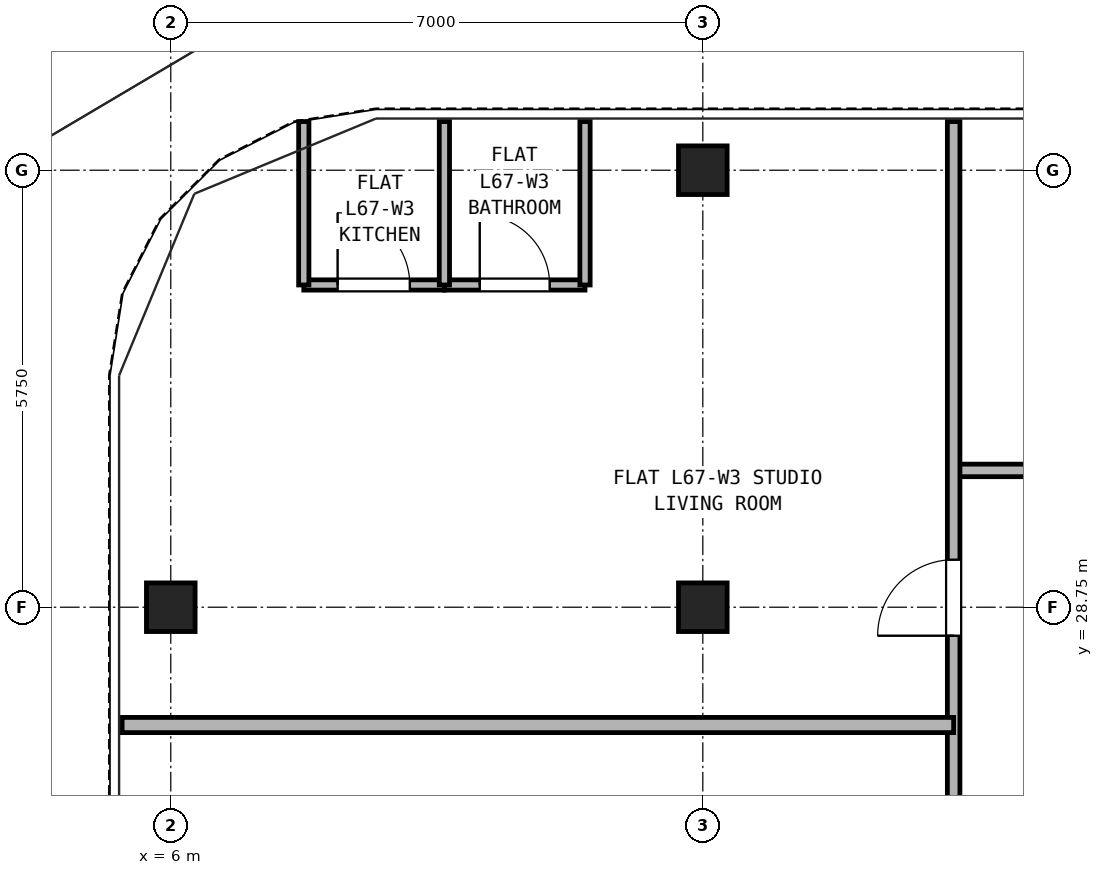
"""IFC4 building model, lengths in metres.
Left out: names, types, materials, properties, quantities, classifications, styles, units other than length and angle.
Written with IfcOpenShell. Run it as: python <this file> out.ifc"""

import sys

from ifc_helpers import new_model, si_unit, direction, frame, frame_2d, origin, origin_2d, place, context, subcontext, project, spatial, rectangle, hollow_rectangle, extrude, source, transform, mapped, element, fill, save


model = new_model("IFC4")
c1 = context("Model", 3, precision=1e-05, world=origin(), true_north=direction((0.0, 1.0)))
c2 = subcontext(c1, "Body", "Model", "MODEL_VIEW")
j1 = project(units=[si_unit("LENGTHUNIT", "METRE"), si_unit("PLANEANGLEUNIT", "RADIAN")], contexts=[c1])
p1 = place(None, origin())
s1 = spatial("IfcSite", under=j1, at=p1, CompositionType="ELEMENT")
p2 = place(p1, origin())
s2 = spatial("IfcBuilding", under=s1, at=p2, CompositionType="ELEMENT")
p3 = place(p2, frame((0.0, 0.0, 236.1)))
s3 = spatial("IfcBuildingStorey", under=s2, at=p3, CompositionType="ELEMENT", Elevation=236.1)
m1 = source(origin(), c2, "Body", "SweptSolid", [
    extrude(hollow_rectangle(XDim=0.64, YDim=0.64, WallThickness=0.035, at=origin_2d()), origin(), (0.0, 0.0, 1.0), 2.98),
])
for number, where, z_axis, x_axis in (
    (1, (13.0, 34.5, 0.0), (0.0, 0.0, 1.0), (1.0, 0.0, 0.0)),
    (2, (6.0, 28.75, 0.0), (0.0, 0.0, 1.0), (1.0, 0.0, 0.0)),
    (3, (13.0, 28.75, 0.0), (0.0, 0.0, 1.0), (1.0, 0.0, 0.0)),
):
    element("IfcColumn", number, at=place(p3, frame(where, z_axis=z_axis, x_axis=x_axis)), inside=s3, PredefinedType="COLUMN", context=c2, shape_type="MappedRepresentation", body=[
        mapped(m1, transform((0.0, 0.0, 0.0), x_axis=(1.0, 0.0, 0.0), y_axis=(0.0, 1.0, 0.0), z_axis=(0.0, 0.0, 1.0), scale=1.0)),
    ])
p4 = place(p3, frame((16.3, 30.55, 0.0), z_axis=(0.0, 0.0, 1.0), x_axis=(1.0, 0.0, 0.0)))
e4 = element("IfcWall", 4, at=p4, inside=s3, PredefinedType="PARTITIONING", context=c2, shape_type="SweptSolid", body=[
    extrude(rectangle(XDim=14.4, YDim=0.165, at=frame_2d((7.2, 0.0))), origin(), (0.0, 0.0, 1.0), 2.98),
])
p5 = place(p4, frame((2.1, 0.0, 0.0)))
e5 = element("IfcOpeningElement", 5, at=p5, cuts=e4, PredefinedType="OPENING", context=c2, shape_type="SweptSolid", body=[
    extrude(rectangle(XDim=0.95, YDim=2.15, at=frame_2d((0.475, 1.075))), frame((0.0, 0.093, 0.0), z_axis=(0.0, -1.0, 0.0), x_axis=(1.0, 0.0, 0.0)), (0.0, 0.0, 1.0), 0.185),
])
p6 = place(p4, frame((6.9, 0.0, 0.0)))
e6 = element("IfcOpeningElement", 6, at=p6, cuts=e4, PredefinedType="OPENING", context=c2, shape_type="SweptSolid", body=[
    extrude(rectangle(XDim=0.95, YDim=2.15, at=frame_2d((0.475, 1.075))), frame((0.0, 0.093, 0.0), z_axis=(0.0, -1.0, 0.0), x_axis=(1.0, 0.0, 0.0)), (0.0, 0.0, 1.0), 0.185),
])
p7 = place(p4, frame((11.5, 0.0, 0.0)))
e7 = element("IfcOpeningElement", 7, at=p7, cuts=e4, PredefinedType="OPENING", context=c2, shape_type="SweptSolid", body=[
    extrude(rectangle(XDim=0.92, YDim=2.1, at=frame_2d((0.46, 1.05))), frame((0.0, 0.093, 0.0), z_axis=(0.0, -1.0, 0.0), x_axis=(1.0, 0.0, 0.0)), (0.0, 0.0, 1.0), 0.185),
])
p8 = place(p3, frame((16.3, 11.45, 0.0), z_axis=(0.0, 0.0, 1.0), x_axis=(0.0, 1.0, 0.0)))
e8 = element("IfcWall", 8, at=p8, inside=s3, PredefinedType="PARTITIONING", context=c2, shape_type="SweptSolid", body=[
    extrude(rectangle(XDim=23.69, YDim=0.165, at=frame_2d((11.845, 0.0))), origin(), (0.0, 0.0, 1.0), 2.98),
])
p9 = place(p8, frame((3.275, 0.0, 0.0)))
e9 = element("IfcOpeningElement", 9, at=p9, cuts=e8, PredefinedType="OPENING", context=c2, shape_type="SweptSolid", body=[
    extrude(rectangle(XDim=1.0, YDim=2.15, at=frame_2d((0.5, 1.075))), frame((0.0, 0.093, 0.0), z_axis=(0.0, -1.0, 0.0), x_axis=(1.0, 0.0, 0.0)), (0.0, 0.0, 1.0), 0.185),
])
p10 = place(p8, frame((11.15, 0.0, 0.0)))
e10 = element("IfcOpeningElement", 10, at=p10, cuts=e8, PredefinedType="OPENING", context=c2, shape_type="SweptSolid", body=[
    extrude(rectangle(XDim=1.0, YDim=2.15, at=frame_2d((0.5, 1.075))), frame((0.0, 0.093, 0.0), z_axis=(0.0, -1.0, 0.0), x_axis=(1.0, 0.0, 0.0)), (0.0, 0.0, 1.0), 0.185),
])
p11 = place(p8, frame((16.925, 0.0, 0.0)))
e11 = element("IfcOpeningElement", 11, at=p11, cuts=e8, PredefinedType="OPENING", context=c2, shape_type="SweptSolid", body=[
    extrude(rectangle(XDim=1.0, YDim=2.15, at=frame_2d((0.5, 1.075))), frame((0.0, 0.093, 0.0), z_axis=(0.0, -1.0, 0.0), x_axis=(1.0, 0.0, 0.0)), (0.0, 0.0, 1.0), 0.185),
])
p12 = place(p3, frame((5.36, 27.2, 0.0), z_axis=(0.0, 0.0, 1.0), x_axis=(1.0, 0.0, 0.0)))
e12 = element("IfcWall", 12, at=p12, inside=s3, PredefinedType="PARTITIONING", context=c2, shape_type="SweptSolid", body=[
    extrude(rectangle(XDim=10.94, YDim=0.2, at=frame_2d((5.47, 0.0))), origin(), (0.0, 0.0, 1.0), 2.98),
])
p13 = place(p3, frame((7.75, 32.99, 0.0), z_axis=(0.0, 0.0, 1.0), x_axis=(1.0, 0.0, 0.0)))
e13 = element("IfcWall", 13, at=p13, inside=s3, PredefinedType="PARTITIONING", context=c2, shape_type="SweptSolid", body=[
    extrude(rectangle(XDim=1.85, YDim=0.135, at=frame_2d((0.925, 0.0))), origin(), (0.0, 0.0, 1.0), 2.98),
])
p14 = place(p13, frame((0.445, 0.0, 0.0)))
e14 = element("IfcOpeningElement", 14, at=p14, cuts=e13, PredefinedType="OPENING", context=c2, shape_type="SweptSolid", body=[
    extrude(rectangle(XDim=0.95, YDim=2.15, at=frame_2d((0.475, 1.075))), frame((0.0, 0.077, 0.0), z_axis=(0.0, -1.0, 0.0), x_axis=(1.0, 0.0, 0.0)), (0.0, 0.0, 1.0), 0.155),
])
p15 = place(p3, frame((9.6, 32.99, 0.0), z_axis=(0.0, 0.0, 1.0), x_axis=(1.0, 0.0, 0.0)))
e15 = element("IfcWall", 15, at=p15, inside=s3, PredefinedType="PARTITIONING", context=c2, shape_type="SweptSolid", body=[
    extrude(rectangle(XDim=1.85, YDim=0.135, at=frame_2d((0.925, 0.0))), origin(), (0.0, 0.0, 1.0), 2.98),
])
p16 = place(p15, frame((0.465, 0.0, 0.0)))
e16 = element("IfcOpeningElement", 16, at=p16, cuts=e15, PredefinedType="OPENING", context=c2, shape_type="SweptSolid", body=[
    extrude(rectangle(XDim=0.92, YDim=2.1, at=frame_2d((0.46, 1.05))), frame((0.0, 0.077, 0.0), z_axis=(0.0, -1.0, 0.0), x_axis=(1.0, 0.0, 0.0)), (0.0, 0.0, 1.0), 0.155),
])
for number, where, z_axis, x_axis in (
    (17, (7.75, 32.99, 0.0), (0.0, 0.0, 1.0), (0.0, 1.0, 0.0)),
    (18, (9.6, 32.99, 0.0), (0.0, 0.0, 1.0), (0.0, 1.0, 0.0)),
    (19, (11.45, 32.99, 0.0), (0.0, 0.0, 1.0), (0.0, 1.0, 0.0)),
):
    element("IfcWall", number, at=place(p3, frame(where, z_axis=z_axis, x_axis=x_axis)), inside=s3, PredefinedType="PARTITIONING", context=c2, shape_type="SweptSolid", body=[
        extrude(rectangle(XDim=2.15, YDim=0.135, at=frame_2d((1.075, 0.0))), origin(), (0.0, 0.0, 1.0), 2.98),
    ])
p17 = place(p14, frame((0.95, 0.0, 0.0), z_axis=(0.0, 0.0, 1.0), x_axis=(-1.0, 0.0, 0.0)))
e20 = element("IfcDoor", 20, at=p17, inside=s3, OperationType="SINGLE_SWING_LEFT", PredefinedType="DOOR", context=c2, shape_type="SweptSolid", body=[
    extrude(rectangle(XDim=0.95, YDim=2.15, at=frame_2d((0.475, 1.075))), frame((0.0, 0.025, 0.0), z_axis=(0.0, -1.0, 0.0), x_axis=(1.0, 0.0, 0.0)), (0.0, 0.0, 1.0), 0.05),
])
fill(e14, e20)
p18 = place(p16, frame((0.92, 0.0, 0.0), z_axis=(0.0, 0.0, 1.0), x_axis=(-1.0, 0.0, 0.0)))
e21 = element("IfcDoor", 21, at=p18, inside=s3, OperationType="SINGLE_SWING_LEFT", PredefinedType="DOOR", context=c2, shape_type="SweptSolid", body=[
    extrude(rectangle(XDim=0.92, YDim=2.1, at=frame_2d((0.46, 1.05))), frame((0.0, 0.025, 0.0), z_axis=(0.0, -1.0, 0.0), x_axis=(1.0, 0.0, 0.0)), (0.0, 0.0, 1.0), 0.05),
])
fill(e16, e21)
p19 = place(p11, origin())
e22 = element("IfcDoor", 22, at=p19, inside=s3, OperationType="SINGLE_SWING_LEFT", PredefinedType="DOOR", context=c2, shape_type="SweptSolid", body=[
    extrude(rectangle(XDim=1.0, YDim=2.15, at=frame_2d((0.5, 1.075))), frame((0.0, 0.025, 0.0), z_axis=(0.0, -1.0, 0.0), x_axis=(1.0, 0.0, 0.0)), (0.0, 0.0, 1.0), 0.05),
])
fill(e11, e22)
save(model, sys.argv[1])
